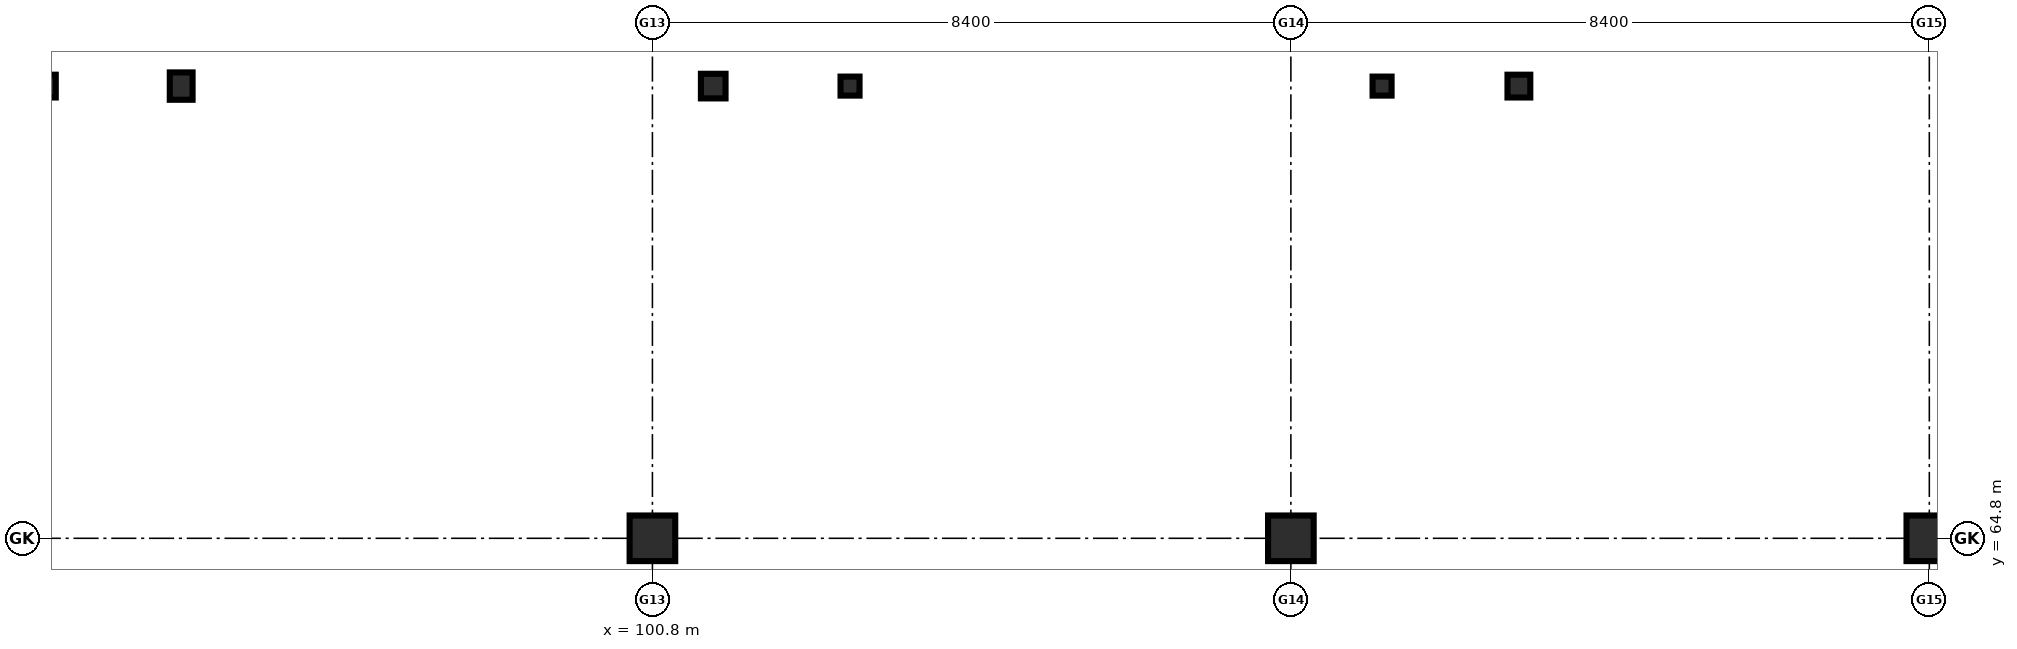
"""IFC4 building model, lengths in metres.
Left out: names, types, materials, properties, quantities, classifications, styles, units other than length and angle.
Written with IfcOpenShell. Run it as: python <this file> out.ifc"""

import sys

from ifc_helpers import new_model, si_unit, direction, frame, origin, origin_2d, place, context, subcontext, project, spatial, rectangle, hollow_rectangle, hollow_circle, i_section, extrude, element, save


model = new_model("IFC4")
c1 = context("Model", 3, precision=1e-05, world=origin(), true_north=direction((0.0, 1.0)))
c2 = subcontext(c1, "Body", "Model", "MODEL_VIEW")
j1 = project(units=[si_unit("LENGTHUNIT", "METRE"), si_unit("PLANEANGLEUNIT", "RADIAN")], contexts=[c1])
p1 = place(None, origin())
s1 = spatial("IfcSite", under=j1, at=p1, CompositionType="ELEMENT")
p2 = place(p1, origin())
s2 = spatial("IfcBuilding", under=s1, at=p2, CompositionType="ELEMENT")
p3 = place(p2, frame((0.0, 0.0, -4.8)))
s3 = spatial("IfcBuildingStorey", under=s2, at=p3, CompositionType="ELEMENT", Elevation=-4.8)
for number, where, z_axis, x_axis in (
    (1, (100.8, 64.8, 0.0), (0.0, 0.0, 1.0), (1.0, 0.0, 0.0)),
    (2, (109.2, 64.8, 0.0), (0.0, 0.0, 1.0), (1.0, 0.0, 0.0)),
    (3, (117.6, 64.8, 0.0), (0.0, 0.0, 1.0), (1.0, 0.0, 0.0)),
):
    element("IfcColumn", number, at=place(p3, frame(where, z_axis=z_axis, x_axis=x_axis)), inside=s3, PredefinedType="COLUMN", context=c2, shape_type="SweptSolid", body=[
        extrude(rectangle(XDim=0.6, YDim=0.6, at=origin_2d()), origin(), (0.0, 0.0, 1.0), 4.8),
    ])
p4 = place(p3, frame((112.2, 70.75, 0.0), z_axis=(0.0, 0.0, 1.0), x_axis=(1.0, 0.0, 0.0)))
e4 = element("IfcColumn", 4, at=p4, inside=s3, PredefinedType="COLUMN", context=c2, shape_type="SweptSolid", body=[
    extrude(i_section(OverallWidth=0.3, OverallDepth=0.3, WebThickness=0.011, FlangeThickness=0.019, FilletRadius=0.027, at=origin_2d()), origin(), (0.0, 0.0, 1.0), 4.8),
])
for number, where, z_axis, x_axis in (
    (5, (110.4, 70.75, 0.0), (0.0, 0.0, 1.0), (1.0, 0.0, 0.0)),
    (6, (103.4, 70.75, 0.0), (0.0, 0.0, 1.0), (1.0, 0.0, 0.0)),
):
    element("IfcColumn", number, at=place(p3, frame(where, z_axis=z_axis, x_axis=x_axis)), inside=s3, PredefinedType="COLUMN", context=c2, shape_type="SweptSolid", body=[
        extrude(hollow_rectangle(XDim=0.25, YDim=0.25, WallThickness=0.01, at=origin_2d()), origin(), (0.0, 0.0, 1.0), 4.8),
    ])
p5 = place(p3, frame((101.6, 70.75, 0.0), z_axis=(0.0, 0.0, 1.0), x_axis=(1.0, 0.0, 0.0)))
e7 = element("IfcColumn", 7, at=p5, inside=s3, PredefinedType="COLUMN", context=c2, shape_type="SweptSolid", body=[
    extrude(hollow_circle(Radius=0.162, WallThickness=0.012, at=origin_2d()), origin(), (0.0, 0.0, 1.0), 4.8),
])
p6 = place(p3, frame((94.6, 70.75, 0.0), z_axis=(0.0, 0.0, 1.0), x_axis=(1.0, 0.0, 0.0)))
e8 = element("IfcColumn", 8, at=p6, inside=s3, PredefinedType="COLUMN", context=c2, shape_type="SweptSolid", body=[
    extrude(i_section(OverallWidth=0.3, OverallDepth=0.36, WebThickness=0.012, FlangeThickness=0.022, FilletRadius=0.027, at=origin_2d()), origin(), (0.0, 0.0, 1.0), 4.8),
])
p7 = place(p3, frame((92.8, 70.75, 0.0), z_axis=(0.0, 0.0, 1.0), x_axis=(1.0, 0.0, 0.0)))
e9 = element("IfcColumn", 9, at=p7, inside=s3, PredefinedType="COLUMN", context=c2, shape_type="SweptSolid", body=[
    extrude(i_section(OverallWidth=0.3, OverallDepth=0.3, WebThickness=0.011, FlangeThickness=0.019, FilletRadius=0.027, at=origin_2d()), origin(), (0.0, 0.0, 1.0), 4.8),
])
save(model, sys.argv[1])
